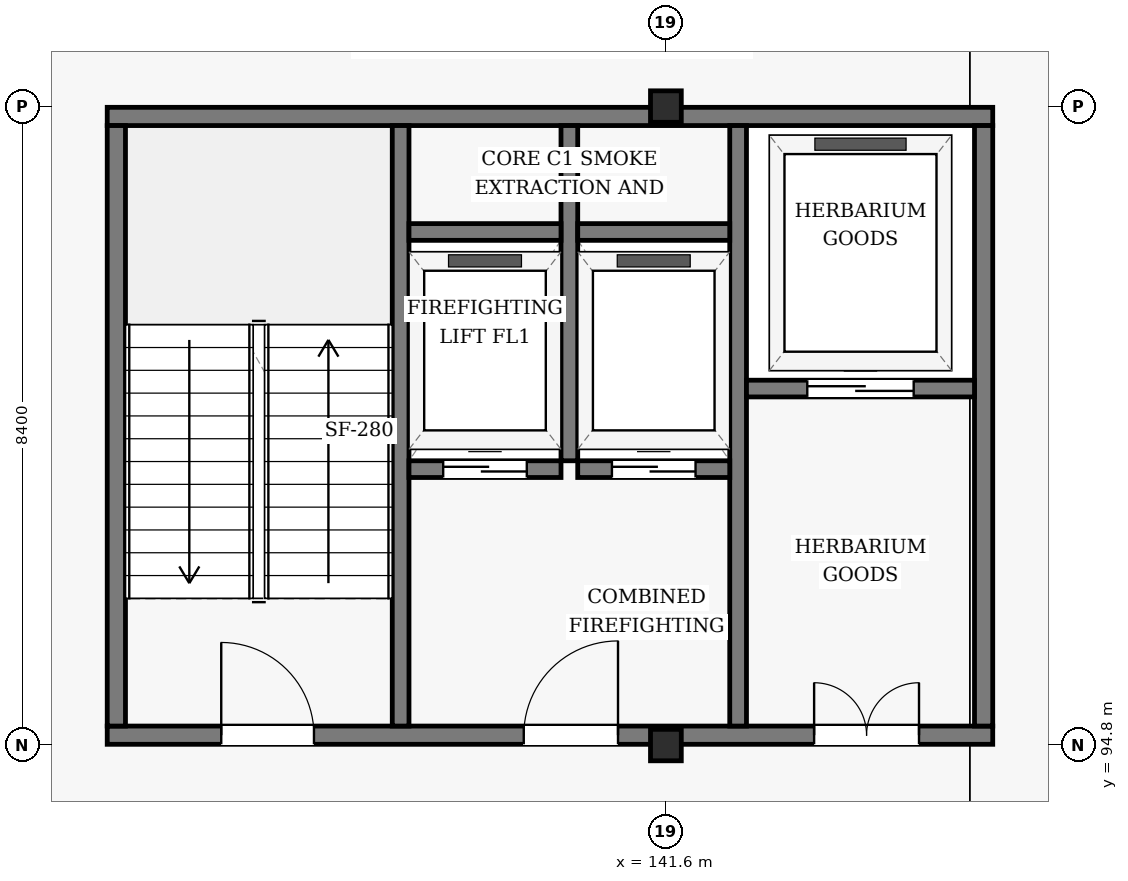
"""IFC4 building model, lengths in metres.
Left out: names, types, materials, properties, quantities, classifications, styles, units other than length and angle.
Written with IfcOpenShell. Run it as: python <this file> out.ifc"""

import sys

from ifc_helpers import new_model, si_unit, direction, frame, frame_2d, origin, origin_2d, place, context, subcontext, project, spatial, rectangle, i_section, extrude, element, fill, save


model = new_model("IFC4")
c1 = context("Model", 3, precision=1e-05, world=origin(), true_north=direction((0.0, 1.0)))
c2 = subcontext(c1, "Body", "Model", "MODEL_VIEW")
j1 = project(units=[si_unit("LENGTHUNIT", "METRE"), si_unit("PLANEANGLEUNIT", "RADIAN")], contexts=[c1])
p1 = place(None, origin())
s1 = spatial("IfcSite", under=j1, at=p1, CompositionType="ELEMENT")
p2 = place(p1, origin())
s2 = spatial("IfcBuilding", under=s1, at=p2, CompositionType="ELEMENT")
p3 = place(p2, frame((0.0, 0.0, 17.1)))
s3 = spatial("IfcBuildingStorey", under=s2, at=p3, CompositionType="ELEMENT", Elevation=17.1)
for number, where, z_axis, x_axis in (
    (1, (141.6, 94.8, 0.0), (0.0, 0.0, 1.0), (1.0, 0.0, 0.0)),
    (2, (141.6, 103.2, 0.0), (0.0, 0.0, 1.0), (1.0, 0.0, 0.0)),
):
    element("IfcColumn", number, at=place(p3, frame(where, z_axis=z_axis, x_axis=x_axis)), inside=s3, PredefinedType="COLUMN", context=c2, shape_type="SweptSolid", body=[
        extrude(i_section(OverallWidth=0.405, OverallDepth=0.414, WebThickness=0.018, FlangeThickness=0.028, FilletRadius=0.022, at=origin_2d()), origin(), (0.0, 0.0, 1.0), 3.9),
    ])
p4 = place(p3, frame((134.25, 94.93, 0.0), z_axis=(0.0, 0.0, 1.0), x_axis=(1.0, 0.0, 0.0)))
e3 = element("IfcWall", 3, at=p4, inside=s3, PredefinedType="SHEAR", context=c2, shape_type="SweptSolid", body=[
    extrude(rectangle(XDim=11.65, YDim=0.24, at=frame_2d((5.825, 0.0))), origin(), (0.0, 0.0, 1.0), 3.6),
])
p5 = place(p4, frame((1.5, 0.0, 0.0)))
e4 = element("IfcOpeningElement", 4, at=p5, cuts=e3, PredefinedType="OPENING", context=c2, shape_type="SweptSolid", body=[
    extrude(rectangle(XDim=1.22, YDim=2.18, at=frame_2d((0.61, 1.09))), frame((0.0, 0.13, 0.0), z_axis=(0.0, -1.0, 0.0), x_axis=(1.0, 0.0, 0.0)), (0.0, 0.0, 1.0), 0.26),
])
p6 = place(p4, frame((5.48, 0.0, 0.0)))
e5 = element("IfcOpeningElement", 5, at=p6, cuts=e3, PredefinedType="OPENING", context=c2, shape_type="SweptSolid", body=[
    extrude(rectangle(XDim=1.24, YDim=2.15, at=frame_2d((0.62, 1.075))), frame((0.0, 0.13, 0.0), z_axis=(0.0, -1.0, 0.0), x_axis=(1.0, 0.0, 0.0)), (0.0, 0.0, 1.0), 0.26),
])
p7 = place(p4, frame((9.3, 0.0, 0.0)))
e6 = element("IfcOpeningElement", 6, at=p7, cuts=e3, PredefinedType="OPENING", context=c2, shape_type="SweptSolid", body=[
    extrude(rectangle(XDim=1.38, YDim=2.15, at=frame_2d((0.69, 1.075))), frame((0.0, 0.13, 0.0), z_axis=(0.0, -1.0, 0.0), x_axis=(1.0, 0.0, 0.0)), (0.0, 0.0, 1.0), 0.26),
])
p8 = place(p3, frame((134.25, 103.07, 0.0), z_axis=(0.0, 0.0, 1.0), x_axis=(1.0, 0.0, 0.0)))
e7 = element("IfcWall", 7, at=p8, inside=s3, PredefinedType="SHEAR", context=c2, shape_type="SweptSolid", body=[
    extrude(rectangle(XDim=11.65, YDim=0.24, at=frame_2d((5.825, 0.0))), origin(), (0.0, 0.0, 1.0), 3.6),
])
p9 = place(p3, frame((134.37, 95.05, 0.0), z_axis=(0.0, 0.0, 1.0), x_axis=(0.0, 1.0, 0.0)))
e8 = element("IfcWall", 8, at=p9, inside=s3, PredefinedType="SHEAR", context=c2, shape_type="SweptSolid", body=[
    extrude(rectangle(XDim=7.9, YDim=0.24, at=frame_2d((3.95, 0.0))), origin(), (0.0, 0.0, 1.0), 3.6),
])
p10 = place(p3, frame((138.11, 95.05, 0.0), z_axis=(0.0, 0.0, 1.0), x_axis=(0.0, 1.0, 0.0)))
e9 = element("IfcWall", 9, at=p10, inside=s3, PredefinedType="SHEAR", context=c2, shape_type="SweptSolid", body=[
    extrude(rectangle(XDim=7.9, YDim=0.22, at=frame_2d((3.95, 0.0))), origin(), (0.0, 0.0, 1.0), 3.6),
])
p11 = place(p3, frame((140.33, 98.54, 0.0), z_axis=(0.0, 0.0, 1.0), x_axis=(0.0, 1.0, 0.0)))
e10 = element("IfcWall", 10, at=p11, inside=s3, PredefinedType="SHEAR", context=c2, shape_type="SweptSolid", body=[
    extrude(rectangle(XDim=4.41, YDim=0.22, at=frame_2d((2.205, 0.0))), origin(), (0.0, 0.0, 1.0), 3.6),
])
p12 = place(p3, frame((142.55, 95.05, 0.0), z_axis=(0.0, 0.0, 1.0), x_axis=(0.0, 1.0, 0.0)))
e11 = element("IfcWall", 11, at=p12, inside=s3, PredefinedType="SHEAR", context=c2, shape_type="SweptSolid", body=[
    extrude(rectangle(XDim=7.9, YDim=0.22, at=frame_2d((3.95, 0.0))), origin(), (0.0, 0.0, 1.0), 3.6),
])
p13 = place(p3, frame((145.78, 95.05, 0.0), z_axis=(0.0, 0.0, 1.0), x_axis=(0.0, 1.0, 0.0)))
e12 = element("IfcWall", 12, at=p13, inside=s3, PredefinedType="SHEAR", context=c2, shape_type="SweptSolid", body=[
    extrude(rectangle(XDim=7.9, YDim=0.24, at=frame_2d((3.95, 0.0))), origin(), (0.0, 0.0, 1.0), 3.6),
])
p14 = place(p3, frame((138.22, 98.43, 0.0), z_axis=(0.0, 0.0, 1.0), x_axis=(1.0, 0.0, 0.0)))
e13 = element("IfcWall", 13, at=p14, inside=s3, PredefinedType="SHEAR", context=c2, shape_type="SweptSolid", body=[
    extrude(rectangle(XDim=2.0, YDim=0.22, at=frame_2d((1.0, 0.0))), origin(), (0.0, 0.0, 1.0), 3.6),
])
p15 = place(p14, frame((0.45, 0.0, 0.0)))
e14 = element("IfcOpeningElement", 14, at=p15, cuts=e13, PredefinedType="OPENING", context=c2, shape_type="SweptSolid", body=[
    extrude(rectangle(XDim=1.1, YDim=2.15, at=frame_2d((0.55, 1.075))), frame((0.0, 0.12, 0.0), z_axis=(0.0, -1.0, 0.0), x_axis=(1.0, 0.0, 0.0)), (0.0, 0.0, 1.0), 0.24),
])
p16 = place(p3, frame((140.44, 98.43, 0.0), z_axis=(0.0, 0.0, 1.0), x_axis=(1.0, 0.0, 0.0)))
e15 = element("IfcWall", 15, at=p16, inside=s3, PredefinedType="SHEAR", context=c2, shape_type="SweptSolid", body=[
    extrude(rectangle(XDim=2.0, YDim=0.22, at=frame_2d((1.0, 0.0))), origin(), (0.0, 0.0, 1.0), 3.6),
])
p17 = place(p16, frame((0.45, 0.0, 0.0)))
e16 = element("IfcOpeningElement", 16, at=p17, cuts=e15, PredefinedType="OPENING", context=c2, shape_type="SweptSolid", body=[
    extrude(rectangle(XDim=1.1, YDim=2.15, at=frame_2d((0.55, 1.075))), frame((0.0, 0.12, 0.0), z_axis=(0.0, -1.0, 0.0), x_axis=(1.0, 0.0, 0.0)), (0.0, 0.0, 1.0), 0.24),
])
for number, where, z_axis, x_axis in (
    (17, (138.22, 101.55, 0.0), (0.0, 0.0, 1.0), (1.0, 0.0, 0.0)),
    (18, (140.44, 101.55, 0.0), (0.0, 0.0, 1.0), (1.0, 0.0, 0.0)),
):
    element("IfcWall", number, at=place(p3, frame(where, z_axis=z_axis, x_axis=x_axis)), inside=s3, PredefinedType="SHEAR", context=c2, shape_type="SweptSolid", body=[
        extrude(rectangle(XDim=2.0, YDim=0.22, at=frame_2d((1.0, 0.0))), origin(), (0.0, 0.0, 1.0), 3.6),
    ])
p18 = place(p3, frame((142.66, 99.49, 0.0), z_axis=(0.0, 0.0, 1.0), x_axis=(1.0, 0.0, 0.0)))
e19 = element("IfcWall", 19, at=p18, inside=s3, PredefinedType="SHEAR", context=c2, shape_type="SweptSolid", body=[
    extrude(rectangle(XDim=3.0, YDim=0.22, at=frame_2d((1.5, 0.0))), origin(), (0.0, 0.0, 1.0), 3.6),
])
p19 = place(p18, frame((0.8, 0.0, 0.0)))
e20 = element("IfcOpeningElement", 20, at=p19, cuts=e19, PredefinedType="OPENING", context=c2, shape_type="SweptSolid", body=[
    extrude(rectangle(XDim=1.4, YDim=2.2, at=frame_2d((0.7, 1.1))), frame((0.0, 0.12, 0.0), z_axis=(0.0, -1.0, 0.0), x_axis=(1.0, 0.0, 0.0)), (0.0, 0.0, 1.0), 0.24),
])
p20 = place(p5, origin())
e21 = element("IfcDoor", 21, at=p20, inside=s3, OperationType="SINGLE_SWING_LEFT", PredefinedType="DOOR", context=c2, shape_type="SweptSolid", body=[
    extrude(rectangle(XDim=1.22, YDim=2.18, at=frame_2d((0.61, 1.09))), frame((0.0, 0.025, 0.0), z_axis=(0.0, -1.0, 0.0), x_axis=(1.0, 0.0, 0.0)), (0.0, 0.0, 1.0), 0.05),
])
fill(e4, e21)
p21 = place(p6, frame((1.24, 0.0, 0.0), z_axis=(0.0, 0.0, 1.0), x_axis=(-1.0, 0.0, 0.0)))
e22 = element("IfcDoor", 22, at=p21, inside=s3, OperationType="SINGLE_SWING_RIGHT", PredefinedType="DOOR", context=c2, shape_type="SweptSolid", body=[
    extrude(rectangle(XDim=1.24, YDim=2.15, at=frame_2d((0.62, 1.075))), frame((0.0, 0.025, 0.0), z_axis=(0.0, -1.0, 0.0), x_axis=(1.0, 0.0, 0.0)), (0.0, 0.0, 1.0), 0.05),
])
fill(e5, e22)
p22 = place(p7, frame((1.38, 0.0, 0.0), z_axis=(0.0, 0.0, 1.0), x_axis=(-1.0, 0.0, 0.0)))
e23 = element("IfcDoor", 23, at=p22, inside=s3, OperationType="DOUBLE_DOOR_SINGLE_SWING", PredefinedType="DOOR", context=c2, shape_type="SweptSolid", body=[
    extrude(rectangle(XDim=1.38, YDim=2.15, at=frame_2d((0.69, 1.075))), frame((0.0, 0.025, 0.0), z_axis=(0.0, -1.0, 0.0), x_axis=(1.0, 0.0, 0.0)), (0.0, 0.0, 1.0), 0.05),
])
fill(e6, e23)
p23 = place(p15, origin())
e24 = element("IfcDoor", 24, at=p23, inside=s3, OperationType="SLIDING_TO_LEFT", PredefinedType="DOOR", context=c2, shape_type="SweptSolid", body=[
    extrude(rectangle(XDim=1.1, YDim=2.15, at=frame_2d((0.55, 1.075))), frame((0.0, 0.025, 0.0), z_axis=(0.0, -1.0, 0.0), x_axis=(1.0, 0.0, 0.0)), (0.0, 0.0, 1.0), 0.05),
])
fill(e14, e24)
p24 = place(p17, origin())
e25 = element("IfcDoor", 25, at=p24, inside=s3, OperationType="SLIDING_TO_LEFT", PredefinedType="DOOR", context=c2, shape_type="SweptSolid", body=[
    extrude(rectangle(XDim=1.1, YDim=2.15, at=frame_2d((0.55, 1.075))), frame((0.0, 0.025, 0.0), z_axis=(0.0, -1.0, 0.0), x_axis=(1.0, 0.0, 0.0)), (0.0, 0.0, 1.0), 0.05),
])
fill(e16, e25)
p25 = place(p19, origin())
e26 = element("IfcDoor", 26, at=p25, inside=s3, OperationType="SLIDING_TO_LEFT", PredefinedType="DOOR", context=c2, shape_type="SweptSolid", body=[
    extrude(rectangle(XDim=1.4, YDim=2.2, at=frame_2d((0.7, 1.1))), frame((0.0, 0.025, 0.0), z_axis=(0.0, -1.0, 0.0), x_axis=(1.0, 0.0, 0.0)), (0.0, 0.0, 1.0), 0.05),
])
fill(e20, e26)
save(model, sys.argv[1])
